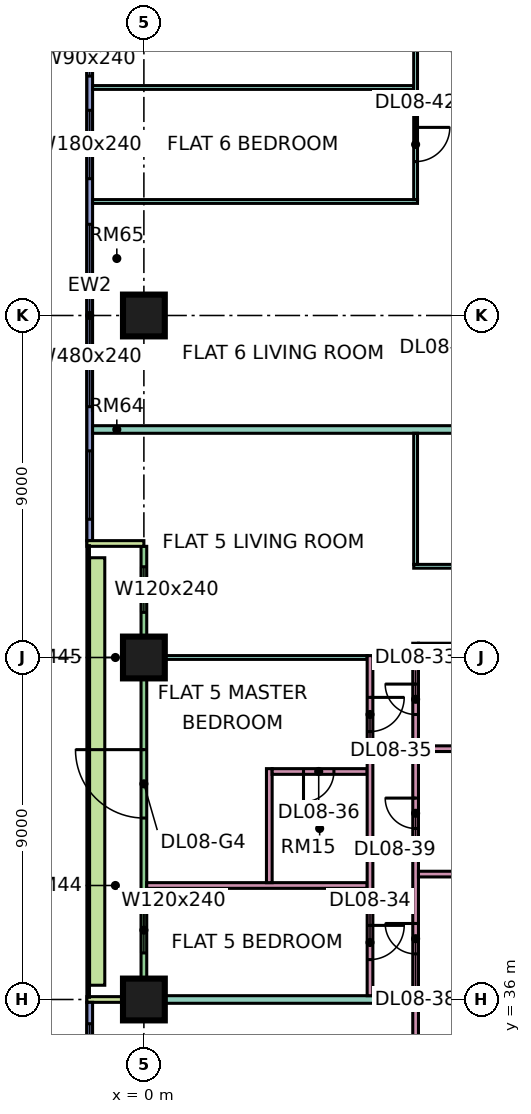
"""IFC4 building model, lengths in metres.
Left out: names, types, materials, properties, quantities, classifications, styles, units other than length and angle.
Written with IfcOpenShell. Run it as: python <this file> out.ifc"""

import sys

from ifc_helpers import new_model, si_unit, direction, frame, frame_2d, origin, origin_2d, place, context, subcontext, project, spatial, rectangle, extrude, element, fill, save


model = new_model("IFC4")
c1 = context("Model", 3, precision=1e-05, world=origin(), true_north=direction((0.0, 1.0)))
c2 = subcontext(c1, "Body", "Model", "MODEL_VIEW")
j1 = project(units=[si_unit("LENGTHUNIT", "METRE"), si_unit("PLANEANGLEUNIT", "RADIAN")], contexts=[c1])
p1 = place(None, origin())
s1 = spatial("IfcSite", under=j1, at=p1, CompositionType="ELEMENT")
p2 = place(p1, origin())
s2 = spatial("IfcBuilding", under=s1, at=p2, CompositionType="ELEMENT")
p3 = place(p2, frame((0.0, 0.0, 45.15)))
s3 = spatial("IfcBuildingStorey", under=s2, at=p3, CompositionType="ELEMENT", Elevation=45.15)
p4 = place(p3, frame((0.0, 36.0, 0.0), z_axis=(0.0, 0.0, 1.0), x_axis=(1.0, 0.0, 0.0)))
e1 = element("IfcColumn", 1, at=p4, inside=s3, PredefinedType="COLUMN", context=c2, shape_type="SweptSolid", body=[
    extrude(rectangle(XDim=1.1, YDim=1.1, at=origin_2d()), origin(), (0.0, 0.0, 1.0), 3.75),
])
for number, where, z_axis, x_axis in (
    (2, (0.0, 45.0, 0.0), (0.0, 0.0, 1.0), (1.0, 0.0, 0.0)),
    (3, (0.0, 54.0, 0.0), (0.0, 0.0, 1.0), (1.0, 0.0, 0.0)),
):
    element("IfcColumn", number, at=place(p3, frame(where, z_axis=z_axis, x_axis=x_axis)), inside=s3, PredefinedType="COLUMN", context=c2, shape_type="SweptSolid", body=[
        extrude(rectangle(XDim=1.1, YDim=1.1, at=origin_2d()), origin(), (0.0, 0.0, 1.0), 3.75),
    ])
p5 = place(p3, frame((-1.425, 61.5, 0.0), z_axis=(0.0, 0.0, 1.0), x_axis=(0.0, -1.0, 0.0)))
e4 = element("IfcWall", 4, at=p5, inside=s3, PredefinedType="SOLIDWALL", context=c2, shape_type="SweptSolid", body=[
    extrude(rectangle(XDim=13.425, YDim=0.15, at=frame_2d((6.712, 0.0))), origin(), (0.0, 0.0, 1.0), 3.35),
])
p6 = place(p5, frame((0.3, 0.0, 0.45)))
e5 = element("IfcOpeningElement", 5, at=p6, cuts=e4, PredefinedType="OPENING", context=c2, shape_type="SweptSolid", body=[
    extrude(rectangle(XDim=0.9, YDim=2.4, at=frame_2d((0.45, 1.2))), frame((0.0, 0.085, 0.0), z_axis=(0.0, -1.0, 0.0), x_axis=(1.0, 0.0, 0.0)), (0.0, 0.0, 1.0), 0.17),
])
p7 = place(p5, frame((2.1, 0.0, 0.45)))
e6 = element("IfcOpeningElement", 6, at=p7, cuts=e4, PredefinedType="OPENING", context=c2, shape_type="SweptSolid", body=[
    extrude(rectangle(XDim=1.8, YDim=2.4, at=frame_2d((0.9, 1.2))), frame((0.0, 0.085, 0.0), z_axis=(0.0, -1.0, 0.0), x_axis=(1.0, 0.0, 0.0)), (0.0, 0.0, 1.0), 0.17),
])
p8 = place(p5, frame((5.1, 0.0, 0.45)))
e7 = element("IfcOpeningElement", 7, at=p8, cuts=e4, PredefinedType="OPENING", context=c2, shape_type="SweptSolid", body=[
    extrude(rectangle(XDim=4.8, YDim=2.4, at=frame_2d((2.4, 1.2))), frame((0.0, 0.085, 0.0), z_axis=(0.0, -1.0, 0.0), x_axis=(1.0, 0.0, 0.0)), (0.0, 0.0, 1.0), 0.17),
])
p9 = place(p5, frame((11.062, 0.0, 0.45)))
e8 = element("IfcOpeningElement", 8, at=p9, cuts=e4, PredefinedType="OPENING", context=c2, shape_type="SweptSolid", body=[
    extrude(rectangle(XDim=1.8, YDim=2.4, at=frame_2d((0.9, 1.2))), frame((0.0, 0.085, 0.0), z_axis=(0.0, -1.0, 0.0), x_axis=(1.0, 0.0, 0.0)), (0.0, 0.0, 1.0), 0.17),
])
p10 = place(p3, frame((0.0, 47.925, 0.0), z_axis=(0.0, 0.0, 1.0), x_axis=(0.0, -1.0, 0.0)))
e9 = element("IfcWall", 9, at=p10, inside=s3, PredefinedType="SOLIDWALL", context=c2, shape_type="SweptSolid", body=[
    extrude(rectangle(XDim=11.85, YDim=0.15, at=frame_2d((5.925, 0.0))), origin(), (0.0, 0.0, 1.0), 3.35),
])
p11 = place(p10, frame((0.538, 0.0, 0.45)))
e10 = element("IfcOpeningElement", 10, at=p11, cuts=e9, PredefinedType="OPENING", context=c2, shape_type="SweptSolid", body=[
    extrude(rectangle(XDim=1.2, YDim=2.4, at=frame_2d((0.6, 1.2))), frame((0.0, 0.085, 0.0), z_axis=(0.0, -1.0, 0.0), x_axis=(1.0, 0.0, 0.0)), (0.0, 0.0, 1.0), 0.17),
])
p12 = place(p10, frame((5.35, 0.0, 0.0)))
e11 = element("IfcOpeningElement", 11, at=p12, cuts=e9, PredefinedType="OPENING", context=c2, shape_type="SweptSolid", body=[
    extrude(rectangle(XDim=1.8, YDim=2.4, at=frame_2d((0.9, 1.2))), frame((0.0, 0.085, 0.0), z_axis=(0.0, -1.0, 0.0), x_axis=(1.0, 0.0, 0.0)), (0.0, 0.0, 1.0), 0.17),
])
p13 = place(p10, frame((9.5, 0.0, 0.45)))
e12 = element("IfcOpeningElement", 12, at=p13, cuts=e9, PredefinedType="OPENING", context=c2, shape_type="SweptSolid", body=[
    extrude(rectangle(XDim=1.2, YDim=2.4, at=frame_2d((0.6, 1.2))), frame((0.0, 0.085, 0.0), z_axis=(0.0, -1.0, 0.0), x_axis=(1.0, 0.0, 0.0)), (0.0, 0.0, 1.0), 0.17),
])
for number, where, z_axis, x_axis in (
    (13, (-1.5, 48.0, 0.0), (0.0, 0.0, 1.0), (1.0, 0.0, 0.0)),
    (14, (-1.5, 36.0, 0.0), (0.0, 0.0, 1.0), (1.0, 0.0, 0.0)),
):
    element("IfcWall", number, at=place(p3, frame(where, z_axis=z_axis, x_axis=x_axis)), inside=s3, PredefinedType="SOLIDWALL", context=c2, shape_type="SweptSolid", body=[
        extrude(rectangle(XDim=1.5, YDim=0.15, at=frame_2d((0.75, 0.0))), origin(), (0.0, 0.0, 1.0), 3.35),
    ])
p14 = place(p3, frame((-1.425, 35.925, 0.0), z_axis=(0.0, 0.0, 1.0), x_axis=(0.0, -1.0, 0.0)))
e15 = element("IfcWall", 15, at=p14, inside=s3, PredefinedType="SOLIDWALL", context=c2, shape_type="SweptSolid", body=[
    extrude(rectangle(XDim=11.85, YDim=0.15, at=frame_2d((5.925, 0.0))), origin(), (0.0, 0.0, 1.0), 3.35),
])
p15 = place(p14, frame((0.562, 0.0, 0.45)))
e16 = element("IfcOpeningElement", 16, at=p15, cuts=e15, PredefinedType="OPENING", context=c2, shape_type="SweptSolid", body=[
    extrude(rectangle(XDim=1.8, YDim=2.4, at=frame_2d((0.9, 1.2))), frame((0.0, 0.085, 0.0), z_axis=(0.0, -1.0, 0.0), x_axis=(1.0, 0.0, 0.0)), (0.0, 0.0, 1.0), 0.17),
])
p16 = place(p14, frame((3.525, 0.0, 0.45)))
e17 = element("IfcOpeningElement", 17, at=p16, cuts=e15, PredefinedType="OPENING", context=c2, shape_type="SweptSolid", body=[
    extrude(rectangle(XDim=1.8, YDim=2.4, at=frame_2d((0.9, 1.2))), frame((0.0, 0.085, 0.0), z_axis=(0.0, -1.0, 0.0), x_axis=(1.0, 0.0, 0.0)), (0.0, 0.0, 1.0), 0.17),
])
p17 = place(p14, frame((7.387, 0.0, 0.45)))
e18 = element("IfcOpeningElement", 18, at=p17, cuts=e15, PredefinedType="OPENING", context=c2, shape_type="SweptSolid", body=[
    extrude(rectangle(XDim=3.0, YDim=2.4, at=frame_2d((1.5, 1.2))), frame((0.0, 0.085, 0.0), z_axis=(0.0, -1.0, 0.0), x_axis=(1.0, 0.0, 0.0)), (0.0, 0.0, 1.0), 0.17),
])
p18 = place(p3, frame((-1.229, 47.625, 0.0), z_axis=(0.0, 0.0, 1.0), x_axis=(0.0, -1.0, 0.0)))
e19 = element("IfcWall", 19, at=p18, inside=s3, PredefinedType="SOLIDWALL", context=c2, shape_type="SweptSolid", body=[
    extrude(rectangle(XDim=11.25, YDim=0.4, at=frame_2d((5.625, 0.0))), origin(), (0.0, 0.0, 1.0), 0.7),
])
p19 = place(p3, frame((-1.351, 60.0, 0.0), z_axis=(0.0, 0.0, 1.0), x_axis=(1.0, 0.0, 0.0)))
e20 = element("IfcWall", 20, at=p19, inside=s3, PredefinedType="PARTITIONING", context=c2, shape_type="SweptSolid", body=[
    extrude(rectangle(XDim=8.451, YDim=0.1, at=frame_2d((4.226, 0.0))), origin(), (0.0, 0.0, 1.0), 3.35),
])
e21 = element("IfcWall", 21, at=p4, inside=s3, PredefinedType="PARTITIONING", context=c2, shape_type="SweptSolid", body=[
    extrude(rectangle(XDim=12.45, YDim=0.2, at=frame_2d((6.225, 0.0))), origin(), (0.0, 0.0, 1.0), 3.35),
])
p20 = place(p3, frame((-1.35, 51.0, 0.0), z_axis=(0.0, 0.0, 1.0), x_axis=(1.0, 0.0, 0.0)))
e22 = element("IfcWall", 22, at=p20, inside=s3, PredefinedType="PARTITIONING", context=c2, shape_type="SweptSolid", body=[
    extrude(rectangle(XDim=13.8, YDim=0.2, at=frame_2d((6.9, 0.0))), origin(), (0.0, 0.0, 1.0), 3.35),
])
p21 = place(p3, frame((-1.35, 57.0, 0.0), z_axis=(0.0, 0.0, 1.0), x_axis=(1.0, 0.0, 0.0)))
e23 = element("IfcWall", 23, at=p21, inside=s3, PredefinedType="PARTITIONING", context=c2, shape_type="SweptSolid", body=[
    extrude(rectangle(XDim=8.55, YDim=0.1, at=frame_2d((4.275, 0.0))), origin(), (0.0, 0.0, 1.0), 3.35),
])
p22 = place(p3, frame((0.074, 39.0, 0.0), z_axis=(0.0, 0.0, 1.0), x_axis=(1.0, 0.0, 0.0)))
e24 = element("IfcWall", 24, at=p22, inside=s3, PredefinedType="PARTITIONING", context=c2, shape_type="SweptSolid", body=[
    extrude(rectangle(XDim=5.801, YDim=0.15, at=frame_2d((2.9, 0.0))), origin(), (0.0, 0.0, 1.0), 3.35),
])
p23 = place(p3, frame((0.074, 45.0, 0.0), z_axis=(0.0, 0.0, 1.0), x_axis=(1.0, 0.0, 0.0)))
e25 = element("IfcWall", 25, at=p23, inside=s3, PredefinedType="PARTITIONING", context=c2, shape_type="SweptSolid", body=[
    extrude(rectangle(XDim=5.801, YDim=0.1, at=frame_2d((2.9, 0.0))), origin(), (0.0, 0.0, 1.0), 3.35),
])
p24 = place(p3, frame((3.3, 39.075, 0.0), z_axis=(0.0, 0.0, 1.0), x_axis=(0.0, 1.0, 0.0)))
e26 = element("IfcWall", 26, at=p24, inside=s3, PredefinedType="PARTITIONING", context=c2, shape_type="SweptSolid", body=[
    extrude(rectangle(XDim=3.0, YDim=0.15, at=frame_2d((1.5, 0.0))), origin(), (0.0, 0.0, 1.0), 3.35),
])
p25 = place(p3, frame((3.375, 42.0, 0.0), z_axis=(0.0, 0.0, 1.0), x_axis=(1.0, 0.0, 0.0)))
e27 = element("IfcWall", 27, at=p25, inside=s3, PredefinedType="PARTITIONING", context=c2, shape_type="SweptSolid", body=[
    extrude(rectangle(XDim=2.5, YDim=0.15, at=frame_2d((1.25, 0.0))), origin(), (0.0, 0.0, 1.0), 3.35),
])
p26 = place(p25, frame((0.825, 0.0, 0.0)))
e28 = element("IfcOpeningElement", 28, at=p26, cuts=e27, PredefinedType="OPENING", context=c2, shape_type="SweptSolid", body=[
    extrude(rectangle(XDim=0.8, YDim=2.1, at=frame_2d((0.4, 1.05))), frame((0.0, 0.085, 0.0), z_axis=(0.0, -1.0, 0.0), x_axis=(1.0, 0.0, 0.0)), (0.0, 0.0, 1.0), 0.17),
])
p27 = place(p3, frame((5.95, 36.1, 0.0), z_axis=(0.0, 0.0, 1.0), x_axis=(0.0, 1.0, 0.0)))
e29 = element("IfcWall", 29, at=p27, inside=s3, PredefinedType="PARTITIONING", context=c2, shape_type="SweptSolid", body=[
    extrude(rectangle(XDim=8.95, YDim=0.15, at=frame_2d((4.475, 0.0))), origin(), (0.0, 0.0, 1.0), 3.35),
])
p28 = place(p27, frame((0.95, 0.0, 0.0)))
e30 = element("IfcOpeningElement", 30, at=p28, cuts=e29, PredefinedType="OPENING", context=c2, shape_type="SweptSolid", body=[
    extrude(rectangle(XDim=0.9, YDim=2.1, at=frame_2d((0.45, 1.05))), frame((0.0, 0.085, 0.0), z_axis=(0.0, -1.0, 0.0), x_axis=(1.0, 0.0, 0.0)), (0.0, 0.0, 1.0), 0.17),
])
p29 = place(p27, frame((6.95, 0.0, 0.0)))
e31 = element("IfcOpeningElement", 31, at=p29, cuts=e29, PredefinedType="OPENING", context=c2, shape_type="SweptSolid", body=[
    extrude(rectangle(XDim=0.9, YDim=2.1, at=frame_2d((0.45, 1.05))), frame((0.0, 0.085, 0.0), z_axis=(0.0, -1.0, 0.0), x_axis=(1.0, 0.0, 0.0)), (0.0, 0.0, 1.0), 0.17),
])
p30 = place(p3, frame((7.1, 47.4, 0.0), z_axis=(0.0, 0.0, 1.0), x_axis=(1.0, 0.0, 0.0)))
e32 = element("IfcWall", 32, at=p30, inside=s3, PredefinedType="PARTITIONING", context=c2, shape_type="SweptSolid", body=[
    extrude(rectangle(XDim=5.35, YDim=0.1, at=frame_2d((2.675, 0.0))), origin(), (0.0, 0.0, 1.0), 3.35),
])
p31 = place(p30, frame((2.3, 0.0, 0.0)))
e33 = element("IfcOpeningElement", 33, at=p31, cuts=e32, PredefinedType="OPENING", context=c2, shape_type="SweptSolid", body=[
    extrude(rectangle(XDim=0.9, YDim=2.1, at=frame_2d((0.45, 1.05))), frame((0.0, 0.06, 0.0), z_axis=(0.0, -1.0, 0.0), x_axis=(1.0, 0.0, 0.0)), (0.0, 0.0, 1.0), 0.12),
])
p32 = place(p3, frame((7.15, 29.95, 0.0), z_axis=(0.0, 0.0, 1.0), x_axis=(0.0, 1.0, 0.0)))
e34 = element("IfcWall", 34, at=p32, inside=s3, PredefinedType="PARTITIONING", context=c2, shape_type="SweptSolid", body=[
    extrude(rectangle(XDim=5.95, YDim=0.15, at=frame_2d((2.975, 0.0))), origin(), (0.0, 0.0, 1.0), 3.35),
])
p33 = place(p32, frame((1.1, 0.0, 0.0)))
e35 = element("IfcOpeningElement", 35, at=p33, cuts=e34, PredefinedType="OPENING", context=c2, shape_type="SweptSolid", body=[
    extrude(rectangle(XDim=0.9, YDim=2.1, at=frame_2d((0.45, 1.05))), frame((0.0, 0.085, 0.0), z_axis=(0.0, -1.0, 0.0), x_axis=(1.0, 0.0, 0.0)), (0.0, 0.0, 1.0), 0.17),
])
p34 = place(p32, frame((4.1, 0.0, 0.0)))
e36 = element("IfcOpeningElement", 36, at=p34, cuts=e34, PredefinedType="OPENING", context=c2, shape_type="SweptSolid", body=[
    extrude(rectangle(XDim=0.9, YDim=2.1, at=frame_2d((0.45, 1.05))), frame((0.0, 0.085, 0.0), z_axis=(0.0, -1.0, 0.0), x_axis=(1.0, 0.0, 0.0)), (0.0, 0.0, 1.0), 0.17),
])
p35 = place(p3, frame((7.15, 36.1, 0.0), z_axis=(0.0, 0.0, 1.0), x_axis=(0.0, 1.0, 0.0)))
e37 = element("IfcWall", 37, at=p35, inside=s3, PredefinedType="PARTITIONING", context=c2, shape_type="SweptSolid", body=[
    extrude(rectangle(XDim=9.275, YDim=0.15, at=frame_2d((4.637, 0.0))), origin(), (0.0, 0.0, 1.0), 3.35),
])
p36 = place(p35, frame((7.4, 0.0, 0.0)))
e38 = element("IfcOpeningElement", 38, at=p36, cuts=e37, PredefinedType="OPENING", context=c2, shape_type="SweptSolid", body=[
    extrude(rectangle(XDim=0.8, YDim=2.1, at=frame_2d((0.4, 1.05))), frame((0.0, 0.085, 0.0), z_axis=(0.0, -1.0, 0.0), x_axis=(1.0, 0.0, 0.0)), (0.0, 0.0, 1.0), 0.17),
])
p37 = place(p35, frame((1.1, 0.0, 0.0)))
e39 = element("IfcOpeningElement", 39, at=p37, cuts=e37, PredefinedType="OPENING", context=c2, shape_type="SweptSolid", body=[
    extrude(rectangle(XDim=0.8, YDim=2.1, at=frame_2d((0.4, 1.05))), frame((0.0, 0.085, 0.0), z_axis=(0.0, -1.0, 0.0), x_axis=(1.0, 0.0, 0.0)), (0.0, 0.0, 1.0), 0.17),
])
p38 = place(p35, frame((4.4, 0.0, 0.0)))
e40 = element("IfcOpeningElement", 40, at=p38, cuts=e37, PredefinedType="OPENING", context=c2, shape_type="SweptSolid", body=[
    extrude(rectangle(XDim=0.8, YDim=2.1, at=frame_2d((0.4, 1.05))), frame((0.0, 0.085, 0.0), z_axis=(0.0, -1.0, 0.0), x_axis=(1.0, 0.0, 0.0)), (0.0, 0.0, 1.0), 0.17),
])
p39 = place(p3, frame((7.15, 47.45, 0.0), z_axis=(0.0, 0.0, 1.0), x_axis=(0.0, 1.0, 0.0)))
e41 = element("IfcWall", 41, at=p39, inside=s3, PredefinedType="PARTITIONING", context=c2, shape_type="SweptSolid", body=[
    extrude(rectangle(XDim=3.45, YDim=0.1, at=frame_2d((1.725, 0.0))), origin(), (0.0, 0.0, 1.0), 3.35),
])
p40 = place(p3, frame((7.15, 57.05, 0.0), z_axis=(0.0, 0.0, 1.0), x_axis=(0.0, 1.0, 0.0)))
e42 = element("IfcWall", 42, at=p40, inside=s3, PredefinedType="PARTITIONING", context=c2, shape_type="SweptSolid", body=[
    extrude(rectangle(XDim=7.3, YDim=0.1, at=frame_2d((3.65, 0.0))), origin(), (0.0, 0.0, 1.0), 3.35),
])
p41 = place(p40, frame((1.0, 0.0, 0.0)))
e43 = element("IfcOpeningElement", 43, at=p41, cuts=e42, PredefinedType="OPENING", context=c2, shape_type="SweptSolid", body=[
    extrude(rectangle(XDim=0.9, YDim=2.1, at=frame_2d((0.45, 1.05))), frame((0.0, 0.06, 0.0), z_axis=(0.0, -1.0, 0.0), x_axis=(1.0, 0.0, 0.0)), (0.0, 0.0, 1.0), 0.12),
])
p42 = place(p40, frame((4.0, 0.0, 0.0)))
e44 = element("IfcOpeningElement", 44, at=p42, cuts=e42, PredefinedType="OPENING", context=c2, shape_type="SweptSolid", body=[
    extrude(rectangle(XDim=0.9, YDim=2.1, at=frame_2d((0.45, 1.05))), frame((0.0, 0.06, 0.0), z_axis=(0.0, -1.0, 0.0), x_axis=(1.0, 0.0, 0.0)), (0.0, 0.0, 1.0), 0.12),
])
for number, where, z_axis, x_axis in (
    (45, (7.225, 39.3, 0.0), (0.0, 0.0, 1.0), (1.0, 0.0, 0.0)),
    (46, (7.225, 42.6, 0.0), (0.0, 0.0, 1.0), (1.0, 0.0, 0.0)),
    (47, (7.225, 45.3, 0.0), (0.0, 0.0, 1.0), (1.0, 0.0, 0.0)),
):
    element("IfcWall", number, at=place(p3, frame(where, z_axis=z_axis, x_axis=x_axis)), inside=s3, PredefinedType="PARTITIONING", context=c2, shape_type="SweptSolid", body=[
        extrude(rectangle(XDim=5.225, YDim=0.15, at=frame_2d((2.612, 0.0))), origin(), (0.0, 0.0, 1.0), 3.35),
    ])
p43 = place(p6, origin())
e48 = element("IfcWindow", 48, at=p43, inside=s3, PartitioningType="SINGLE_PANEL", PredefinedType="WINDOW", context=c2, shape_type="SweptSolid", body=[
    extrude(rectangle(XDim=0.9, YDim=2.4, at=frame_2d((0.45, 1.2))), frame((0.0, 0.03, 0.0), z_axis=(0.0, -1.0, 0.0), x_axis=(1.0, 0.0, 0.0)), (0.0, 0.0, 1.0), 0.06),
])
fill(e5, e48)
p44 = place(p7, origin())
e49 = element("IfcWindow", 49, at=p44, inside=s3, PartitioningType="SINGLE_PANEL", PredefinedType="WINDOW", context=c2, shape_type="SweptSolid", body=[
    extrude(rectangle(XDim=1.8, YDim=2.4, at=frame_2d((0.9, 1.2))), frame((0.0, 0.03, 0.0), z_axis=(0.0, -1.0, 0.0), x_axis=(1.0, 0.0, 0.0)), (0.0, 0.0, 1.0), 0.06),
])
fill(e6, e49)
p45 = place(p8, origin())
e50 = element("IfcWindow", 50, at=p45, inside=s3, PartitioningType="SINGLE_PANEL", PredefinedType="WINDOW", context=c2, shape_type="SweptSolid", body=[
    extrude(rectangle(XDim=4.8, YDim=2.4, at=frame_2d((2.4, 1.2))), frame((0.0, 0.03, 0.0), z_axis=(0.0, -1.0, 0.0), x_axis=(1.0, 0.0, 0.0)), (0.0, 0.0, 1.0), 0.06),
])
fill(e7, e50)
p46 = place(p9, origin())
e51 = element("IfcWindow", 51, at=p46, inside=s3, PartitioningType="SINGLE_PANEL", PredefinedType="WINDOW", context=c2, shape_type="SweptSolid", body=[
    extrude(rectangle(XDim=1.8, YDim=2.4, at=frame_2d((0.9, 1.2))), frame((0.0, 0.03, 0.0), z_axis=(0.0, -1.0, 0.0), x_axis=(1.0, 0.0, 0.0)), (0.0, 0.0, 1.0), 0.06),
])
fill(e8, e51)
p47 = place(p11, origin())
e52 = element("IfcWindow", 52, at=p47, inside=s3, PartitioningType="SINGLE_PANEL", PredefinedType="WINDOW", context=c2, shape_type="SweptSolid", body=[
    extrude(rectangle(XDim=1.2, YDim=2.4, at=frame_2d((0.6, 1.2))), frame((0.0, 0.03, 0.0), z_axis=(0.0, -1.0, 0.0), x_axis=(1.0, 0.0, 0.0)), (0.0, 0.0, 1.0), 0.06),
])
fill(e10, e52)
p48 = place(p12, frame((1.8, 0.0, 0.0), z_axis=(0.0, 0.0, 1.0), x_axis=(-1.0, 0.0, 0.0)))
e53 = element("IfcDoor", 53, at=p48, inside=s3, OperationType="DOUBLE_DOOR_SINGLE_SWING", PredefinedType="DOOR", context=c2, shape_type="SweptSolid", body=[
    extrude(rectangle(XDim=1.8, YDim=2.4, at=frame_2d((0.9, 1.2))), frame((0.0, 0.025, 0.0), z_axis=(0.0, -1.0, 0.0), x_axis=(1.0, 0.0, 0.0)), (0.0, 0.0, 1.0), 0.05),
])
fill(e11, e53)
p49 = place(p13, origin())
e54 = element("IfcWindow", 54, at=p49, inside=s3, PartitioningType="SINGLE_PANEL", PredefinedType="WINDOW", context=c2, shape_type="SweptSolid", body=[
    extrude(rectangle(XDim=1.2, YDim=2.4, at=frame_2d((0.6, 1.2))), frame((0.0, 0.03, 0.0), z_axis=(0.0, -1.0, 0.0), x_axis=(1.0, 0.0, 0.0)), (0.0, 0.0, 1.0), 0.06),
])
fill(e12, e54)
p50 = place(p15, origin())
e55 = element("IfcWindow", 55, at=p50, inside=s3, PartitioningType="SINGLE_PANEL", PredefinedType="WINDOW", context=c2, shape_type="SweptSolid", body=[
    extrude(rectangle(XDim=1.8, YDim=2.4, at=frame_2d((0.9, 1.2))), frame((0.0, 0.03, 0.0), z_axis=(0.0, -1.0, 0.0), x_axis=(1.0, 0.0, 0.0)), (0.0, 0.0, 1.0), 0.06),
])
fill(e16, e55)
p51 = place(p36, frame((0.8, 0.0, 0.0), z_axis=(0.0, 0.0, 1.0), x_axis=(-1.0, 0.0, 0.0)))
e56 = element("IfcDoor", 56, at=p51, inside=s3, OperationType="SINGLE_SWING_RIGHT", PredefinedType="DOOR", context=c2, shape_type="SweptSolid", body=[
    extrude(rectangle(XDim=0.8, YDim=2.1, at=frame_2d((0.4, 1.05))), frame((0.0, 0.025, 0.0), z_axis=(0.0, -1.0, 0.0), x_axis=(1.0, 0.0, 0.0)), (0.0, 0.0, 1.0), 0.05),
])
fill(e38, e56)
p52 = place(p28, origin())
e57 = element("IfcDoor", 57, at=p52, inside=s3, OperationType="SINGLE_SWING_RIGHT", PredefinedType="DOOR", context=c2, shape_type="SweptSolid", body=[
    extrude(rectangle(XDim=0.9, YDim=2.1, at=frame_2d((0.45, 1.05))), frame((0.0, 0.025, 0.0), z_axis=(0.0, -1.0, 0.0), x_axis=(1.0, 0.0, 0.0)), (0.0, 0.0, 1.0), 0.05),
])
fill(e30, e57)
p53 = place(p29, origin())
e58 = element("IfcDoor", 58, at=p53, inside=s3, OperationType="SINGLE_SWING_RIGHT", PredefinedType="DOOR", context=c2, shape_type="SweptSolid", body=[
    extrude(rectangle(XDim=0.9, YDim=2.1, at=frame_2d((0.45, 1.05))), frame((0.0, 0.025, 0.0), z_axis=(0.0, -1.0, 0.0), x_axis=(1.0, 0.0, 0.0)), (0.0, 0.0, 1.0), 0.05),
])
fill(e31, e58)
p54 = place(p26, frame((0.8, 0.0, 0.0), z_axis=(0.0, 0.0, 1.0), x_axis=(-1.0, 0.0, 0.0)))
e59 = element("IfcDoor", 59, at=p54, inside=s3, OperationType="SINGLE_SWING_LEFT", PredefinedType="DOOR", context=c2, shape_type="SweptSolid", body=[
    extrude(rectangle(XDim=0.8, YDim=2.1, at=frame_2d((0.4, 1.05))), frame((0.0, 0.025, 0.0), z_axis=(0.0, -1.0, 0.0), x_axis=(1.0, 0.0, 0.0)), (0.0, 0.0, 1.0), 0.05),
])
fill(e28, e59)
p55 = place(p37, frame((0.8, 0.0, 0.0), z_axis=(0.0, 0.0, 1.0), x_axis=(-1.0, 0.0, 0.0)))
e60 = element("IfcDoor", 60, at=p55, inside=s3, OperationType="SINGLE_SWING_RIGHT", PredefinedType="DOOR", context=c2, shape_type="SweptSolid", body=[
    extrude(rectangle(XDim=0.8, YDim=2.1, at=frame_2d((0.4, 1.05))), frame((0.0, 0.025, 0.0), z_axis=(0.0, -1.0, 0.0), x_axis=(1.0, 0.0, 0.0)), (0.0, 0.0, 1.0), 0.05),
])
fill(e39, e60)
p56 = place(p38, frame((0.8, 0.0, 0.0), z_axis=(0.0, 0.0, 1.0), x_axis=(-1.0, 0.0, 0.0)))
e61 = element("IfcDoor", 61, at=p56, inside=s3, OperationType="SINGLE_SWING_RIGHT", PredefinedType="DOOR", context=c2, shape_type="SweptSolid", body=[
    extrude(rectangle(XDim=0.8, YDim=2.1, at=frame_2d((0.4, 1.05))), frame((0.0, 0.025, 0.0), z_axis=(0.0, -1.0, 0.0), x_axis=(1.0, 0.0, 0.0)), (0.0, 0.0, 1.0), 0.05),
])
fill(e40, e61)
p57 = place(p41, origin())
e62 = element("IfcDoor", 62, at=p57, inside=s3, OperationType="SINGLE_SWING_RIGHT", PredefinedType="DOOR", context=c2, shape_type="SweptSolid", body=[
    extrude(rectangle(XDim=0.9, YDim=2.1, at=frame_2d((0.45, 1.05))), frame((0.0, 0.025, 0.0), z_axis=(0.0, -1.0, 0.0), x_axis=(1.0, 0.0, 0.0)), (0.0, 0.0, 1.0), 0.05),
])
fill(e43, e62)
save(model, sys.argv[1])
